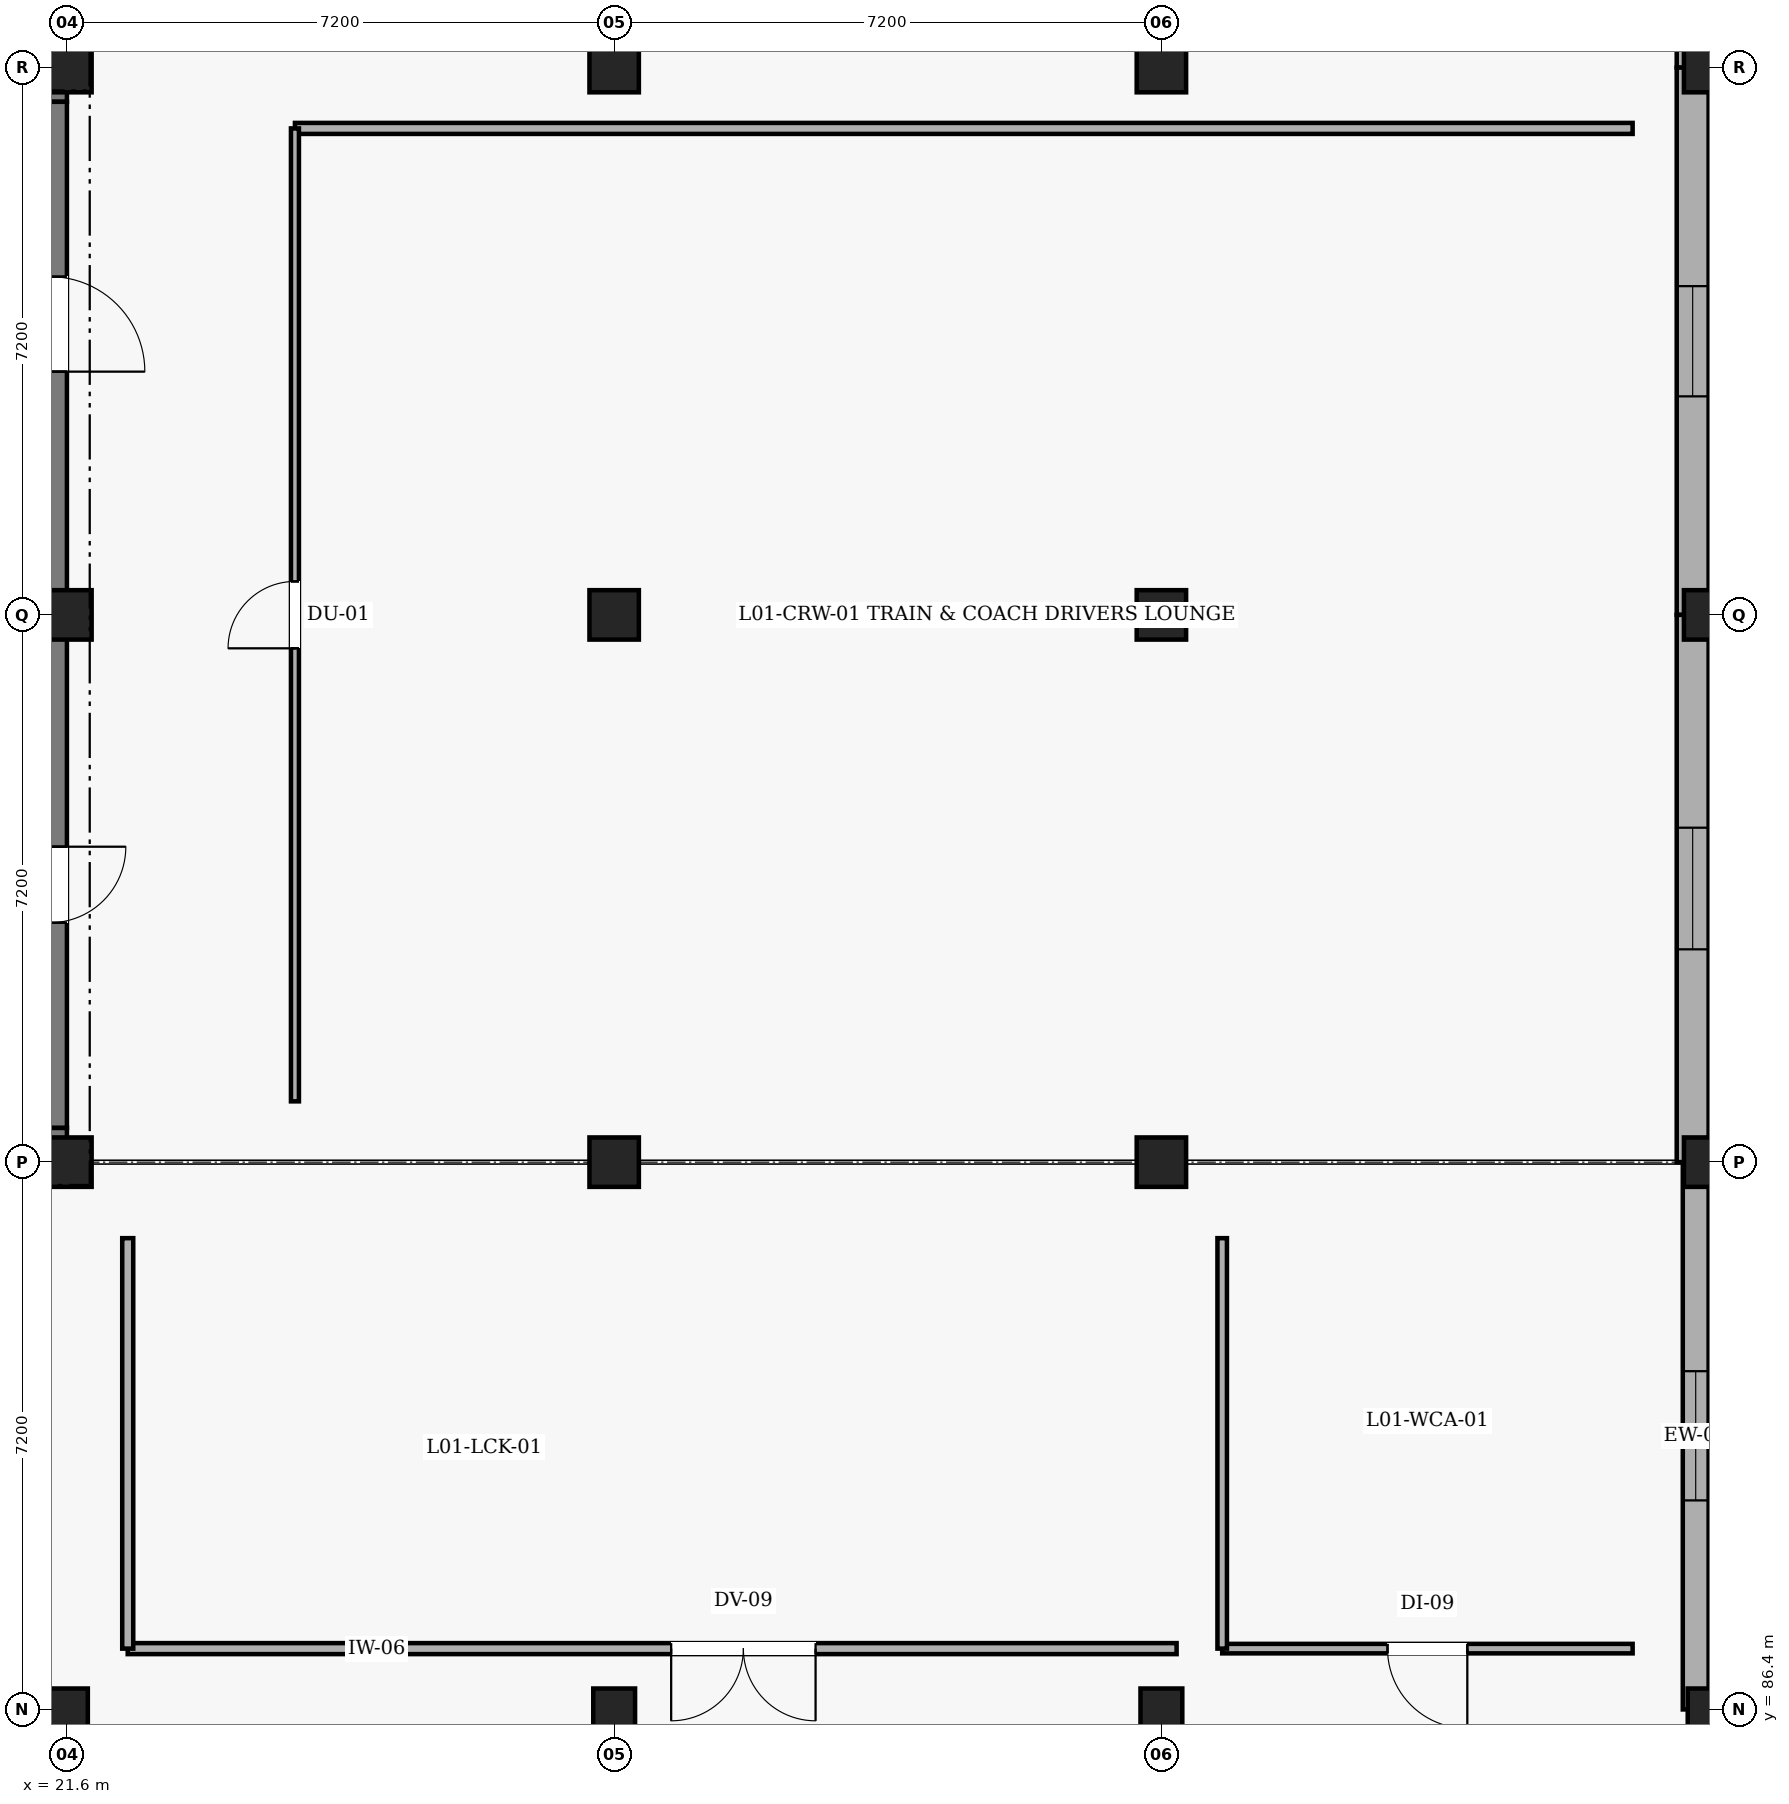
"""IFC4 building model, lengths in metres.
Left out: names, types, materials, properties, quantities, classifications, styles, units other than length and angle.
Written with IfcOpenShell. Run it as: python <this file> out.ifc"""

import sys

from ifc_helpers import new_model, si_unit, direction, frame, frame_2d, origin, origin_2d, place, context, subcontext, project, spatial, rectangle, extrude, element, fill, save


model = new_model("IFC4")
c1 = context("Model", 3, precision=1e-05, world=origin(), true_north=direction((0.0, 1.0)))
c2 = subcontext(c1, "Body", "Model", "MODEL_VIEW")
j1 = project(units=[si_unit("LENGTHUNIT", "METRE"), si_unit("PLANEANGLEUNIT", "RADIAN")], contexts=[c1])
p1 = place(None, origin())
s1 = spatial("IfcSite", under=j1, at=p1, CompositionType="ELEMENT")
p2 = place(p1, origin())
s2 = spatial("IfcBuilding", under=s1, at=p2, CompositionType="ELEMENT")
p3 = place(p2, frame((0.0, 0.0, 5.4)))
s3 = spatial("IfcBuildingStorey", under=s2, at=p3, CompositionType="ELEMENT", Elevation=5.4)
p4 = place(p3, frame((7.2, 107.775, 0.0), z_axis=(0.0, 0.0, 1.0), x_axis=(1.0, 0.0, 0.0)))
e1 = element("IfcWall", 1, at=p4, inside=s3, PredefinedType="SHEAR", context=c2, shape_type="SweptSolid", body=[
    extrude(rectangle(XDim=14.4, YDim=0.45, at=frame_2d((7.2, 0.0))), origin(), (0.0, 0.0, 1.0), 4.2),
])
p5 = place(p4, frame((2.4, 0.0, 0.0)))
e2 = element("IfcOpeningElement", 2, at=p5, cuts=e1, PredefinedType="OPENING", context=c2, shape_type="SweptSolid", body=[
    extrude(rectangle(XDim=1.25, YDim=2.2, at=frame_2d((0.625, 1.1))), frame((0.0, 0.235, 0.0), z_axis=(0.0, -1.0, 0.0), x_axis=(1.0, 0.0, 0.0)), (0.0, 0.0, 1.0), 0.47),
])
p6 = place(p3, frame((21.375, 107.55, 0.0), z_axis=(0.0, 0.0, 1.0), x_axis=(0.0, -1.0, 0.0)))
e3 = element("IfcWall", 3, at=p6, inside=s3, PredefinedType="SHEAR", context=c2, shape_type="SweptSolid", body=[
    extrude(rectangle(XDim=13.5, YDim=0.45, at=frame_2d((6.75, 0.0))), origin(), (0.0, 0.0, 1.0), 4.2),
])
p7 = place(p6, frame((9.8, 0.0, 0.0)))
e4 = element("IfcOpeningElement", 4, at=p7, cuts=e3, PredefinedType="OPENING", context=c2, shape_type="SweptSolid", body=[
    extrude(rectangle(XDim=1.0, YDim=2.15, at=frame_2d((0.5, 1.075))), frame((0.0, 0.235, 0.0), z_axis=(0.0, -1.0, 0.0), x_axis=(1.0, 0.0, 0.0)), (0.0, 0.0, 1.0), 0.47),
])
p8 = place(p6, frame((2.3, 0.0, 0.0)))
e5 = element("IfcOpeningElement", 5, at=p8, cuts=e3, PredefinedType="OPENING", context=c2, shape_type="SweptSolid", body=[
    extrude(rectangle(XDim=1.25, YDim=2.2, at=frame_2d((0.625, 1.1))), frame((0.0, 0.235, 0.0), z_axis=(0.0, -1.0, 0.0), x_axis=(1.0, 0.0, 0.0)), (0.0, 0.0, 1.0), 0.47),
])
p9 = place(p3, frame((21.6, 93.825, 0.0), z_axis=(0.0, 0.0, 1.0), x_axis=(-1.0, 0.0, 0.0)))
e6 = element("IfcWall", 6, at=p9, inside=s3, PredefinedType="SHEAR", context=c2, shape_type="SweptSolid", body=[
    extrude(rectangle(XDim=14.4, YDim=0.45, at=frame_2d((7.2, 0.0))), origin(), (0.0, 0.0, 1.0), 4.2),
])
p10 = place(p3, frame((21.6, 108.2, 0.0), z_axis=(0.0, 0.0, 1.0), x_axis=(-1.0, 0.0, 0.0)))
e7 = element("IfcWall", 7, at=p10, inside=s3, PredefinedType="SHEAR", context=c2, shape_type="SweptSolid", body=[
    extrude(rectangle(XDim=7.2, YDim=0.4, at=frame_2d((3.6, 0.0))), origin(), (0.0, 0.0, 1.0), 4.2),
])
p11 = place(p3, frame((7.2, 86.225, 0.0), z_axis=(0.0, 0.0, 1.0), x_axis=(1.0, 0.0, 0.0)))
e8 = element("IfcWall", 8, at=p11, inside=s3, PredefinedType="SHEAR", context=c2, shape_type="SweptSolid", body=[
    extrude(rectangle(XDim=14.4, YDim=0.35, at=frame_2d((7.2, 0.0))), origin(), (0.0, 0.0, 1.0), 4.2),
])
p12 = place(p3, frame((21.6, 86.4, 0.0), z_axis=(0.0, 0.0, 1.0), x_axis=(1.0, 0.0, 0.0)))
e9 = element("IfcColumn", 9, at=p12, inside=s3, PredefinedType="COLUMN", context=c2, shape_type="SweptSolid", body=[
    extrude(rectangle(XDim=0.55, YDim=0.55, at=origin_2d()), origin(), (0.0, 0.0, 1.0), 3.92),
])
for number, where, z_axis, x_axis in (
    (10, (21.6, 93.6, 0.0), (0.0, 0.0, 1.0), (1.0, 0.0, 0.0)),
    (11, (21.6, 100.8, 0.0), (0.0, 0.0, 1.0), (1.0, 0.0, 0.0)),
    (12, (21.6, 108.0, 0.0), (0.0, 0.0, 1.0), (1.0, 0.0, 0.0)),
):
    element("IfcColumn", number, at=place(p3, frame(where, z_axis=z_axis, x_axis=x_axis)), inside=s3, PredefinedType="COLUMN", context=c2, shape_type="SweptSolid", body=[
        extrude(rectangle(XDim=0.65, YDim=0.65, at=origin_2d()), origin(), (0.0, 0.0, 1.0), 3.88),
    ])
p13 = place(p3, frame((28.8, 86.4, 0.0), z_axis=(0.0, 0.0, 1.0), x_axis=(1.0, 0.0, 0.0)))
e13 = element("IfcColumn", 13, at=p13, inside=s3, PredefinedType="COLUMN", context=c2, shape_type="SweptSolid", body=[
    extrude(rectangle(XDim=0.55, YDim=0.55, at=origin_2d()), origin(), (0.0, 0.0, 1.0), 3.92),
])
for number, where, z_axis, x_axis in (
    (14, (28.8, 93.6, 0.0), (0.0, 0.0, 1.0), (1.0, 0.0, 0.0)),
    (15, (28.8, 100.8, 0.0), (0.0, 0.0, 1.0), (1.0, 0.0, 0.0)),
    (16, (28.8, 108.0, 0.0), (0.0, 0.0, 1.0), (1.0, 0.0, 0.0)),
):
    element("IfcColumn", number, at=place(p3, frame(where, z_axis=z_axis, x_axis=x_axis)), inside=s3, PredefinedType="COLUMN", context=c2, shape_type="SweptSolid", body=[
        extrude(rectangle(XDim=0.65, YDim=0.65, at=origin_2d()), origin(), (0.0, 0.0, 1.0), 3.88),
    ])
p14 = place(p3, frame((36.0, 86.4, 0.0), z_axis=(0.0, 0.0, 1.0), x_axis=(1.0, 0.0, 0.0)))
e17 = element("IfcColumn", 17, at=p14, inside=s3, PredefinedType="COLUMN", context=c2, shape_type="SweptSolid", body=[
    extrude(rectangle(XDim=0.55, YDim=0.55, at=origin_2d()), origin(), (0.0, 0.0, 1.0), 3.92),
])
for number, where, z_axis, x_axis in (
    (18, (36.0, 93.6, 0.0), (0.0, 0.0, 1.0), (1.0, 0.0, 0.0)),
    (19, (36.0, 100.8, 0.0), (0.0, 0.0, 1.0), (1.0, 0.0, 0.0)),
    (20, (36.0, 108.0, 0.0), (0.0, 0.0, 1.0), (1.0, 0.0, 0.0)),
):
    element("IfcColumn", number, at=place(p3, frame(where, z_axis=z_axis, x_axis=x_axis)), inside=s3, PredefinedType="COLUMN", context=c2, shape_type="SweptSolid", body=[
        extrude(rectangle(XDim=0.65, YDim=0.65, at=origin_2d()), origin(), (0.0, 0.0, 1.0), 3.88),
    ])
p15 = place(p3, frame((43.2, 86.4, 0.0), z_axis=(0.0, 0.0, 1.0), x_axis=(0.0, 1.0, 0.0)))
e21 = element("IfcColumn", 21, at=p15, inside=s3, PredefinedType="COLUMN", context=c2, shape_type="SweptSolid", body=[
    extrude(rectangle(XDim=0.55, YDim=0.55, at=origin_2d()), origin(), (0.0, 0.0, 1.0), 3.92),
])
for number, where, z_axis, x_axis in (
    (22, (43.2, 93.6, 0.0), (0.0, 0.0, 1.0), (0.0, 1.0, 0.0)),
    (23, (43.2, 100.8, 0.0), (0.0, 0.0, 1.0), (1.0, 0.0, 0.0)),
    (24, (43.2, 108.0, 0.0), (0.0, 0.0, 1.0), (1.0, 0.0, 0.0)),
):
    element("IfcColumn", number, at=place(p3, frame(where, z_axis=z_axis, x_axis=x_axis)), inside=s3, PredefinedType="COLUMN", context=c2, shape_type="SweptSolid", body=[
        extrude(rectangle(XDim=0.65, YDim=0.65, at=origin_2d()), origin(), (0.0, 0.0, 1.0), 3.88),
    ])
p16 = place(p3, frame((42.99, 115.2, 0.0), z_axis=(0.0, 0.0, 1.0), x_axis=(0.0, -1.0, 0.0)))
e25 = element("IfcWall", 25, at=p16, inside=s3, PredefinedType="SOLIDWALL", context=c2, shape_type="SweptSolid", body=[
    extrude(rectangle(XDim=7.2, YDim=0.42, at=frame_2d((3.6, 0.0))), origin(), (0.0, 0.0, 1.0), 3.55),
])
p17 = place(p16, frame((2.925, 0.0, 0.9)))
e26 = element("IfcOpeningElement", 26, at=p17, cuts=e25, PredefinedType="OPENING", context=c2, shape_type="SweptSolid", body=[
    extrude(rectangle(XDim=1.35, YDim=1.35, at=frame_2d((0.675, 0.675))), frame((0.0, 0.22, 0.0), z_axis=(0.0, -1.0, 0.0), x_axis=(1.0, 0.0, 0.0)), (0.0, 0.0, 1.0), 0.44),
])
p18 = place(p3, frame((42.99, 108.0, 0.0), z_axis=(0.0, 0.0, 1.0), x_axis=(0.0, -1.0, 0.0)))
e27 = element("IfcWall", 27, at=p18, inside=s3, PredefinedType="SOLIDWALL", context=c2, shape_type="SweptSolid", body=[
    extrude(rectangle(XDim=7.2, YDim=0.42, at=frame_2d((3.6, 0.0))), origin(), (0.0, 0.0, 1.0), 3.55),
])
p19 = place(p18, frame((2.875, 0.0, 0.9)))
e28 = element("IfcOpeningElement", 28, at=p19, cuts=e27, PredefinedType="OPENING", context=c2, shape_type="SweptSolid", body=[
    extrude(rectangle(XDim=1.45, YDim=1.45, at=frame_2d((0.725, 0.725))), frame((0.0, 0.22, 0.0), z_axis=(0.0, -1.0, 0.0), x_axis=(1.0, 0.0, 0.0)), (0.0, 0.0, 1.0), 0.44),
])
p20 = place(p3, frame((42.99, 100.8, 0.0), z_axis=(0.0, 0.0, 1.0), x_axis=(0.0, -1.0, 0.0)))
e29 = element("IfcWall", 29, at=p20, inside=s3, PredefinedType="SOLIDWALL", context=c2, shape_type="SweptSolid", body=[
    extrude(rectangle(XDim=7.2, YDim=0.42, at=frame_2d((3.6, 0.0))), origin(), (0.0, 0.0, 1.0), 3.55),
])
p21 = place(p20, frame((2.8, 0.0, 0.9)))
e30 = element("IfcOpeningElement", 30, at=p21, cuts=e29, PredefinedType="OPENING", context=c2, shape_type="SweptSolid", body=[
    extrude(rectangle(XDim=1.6, YDim=1.5, at=frame_2d((0.8, 0.75))), frame((0.0, 0.22, 0.0), z_axis=(0.0, -1.0, 0.0), x_axis=(1.0, 0.0, 0.0)), (0.0, 0.0, 1.0), 0.44),
])
p22 = place(p3, frame((43.03, 93.6, 0.0), z_axis=(0.0, 0.0, 1.0), x_axis=(0.0, -1.0, 0.0)))
e31 = element("IfcWall", 31, at=p22, inside=s3, PredefinedType="SOLIDWALL", context=c2, shape_type="SweptSolid", body=[
    extrude(rectangle(XDim=7.2, YDim=0.34, at=frame_2d((3.6, 0.0))), origin(), (0.0, 0.0, 1.0), 3.59),
])
p23 = place(p22, frame((2.75, 0.0, 0.9)))
e32 = element("IfcOpeningElement", 32, at=p23, cuts=e31, PredefinedType="OPENING", context=c2, shape_type="SweptSolid", body=[
    extrude(rectangle(XDim=1.7, YDim=1.55, at=frame_2d((0.85, 0.775))), frame((0.0, 0.18, 0.0), z_axis=(0.0, -1.0, 0.0), x_axis=(1.0, 0.0, 0.0)), (0.0, 0.0, 1.0), 0.36),
])
p24 = place(p3, frame((36.2, 87.2, 0.0), z_axis=(0.0, 0.0, 1.0), x_axis=(-1.0, 0.0, 0.0)))
e33 = element("IfcWall", 33, at=p24, inside=s3, PredefinedType="PARTITIONING", context=c2, shape_type="SweptSolid", body=[
    extrude(rectangle(XDim=13.8, YDim=0.145, at=frame_2d((6.9, 0.0))), origin(), (0.0, 0.0, 1.0), 3.52),
])
p25 = place(p24, frame((4.75, 0.0, 0.0)))
e34 = element("IfcOpeningElement", 34, at=p25, cuts=e33, PredefinedType="OPENING", context=c2, shape_type="SweptSolid", body=[
    extrude(rectangle(XDim=1.9, YDim=2.3, at=frame_2d((0.95, 1.15))), frame((0.0, 0.083, 0.0), z_axis=(0.0, -1.0, 0.0), x_axis=(1.0, 0.0, 0.0)), (0.0, 0.0, 1.0), 0.165),
])
p26 = place(p3, frame((22.4, 87.2, 0.0), z_axis=(0.0, 0.0, 1.0), x_axis=(0.0, 1.0, 0.0)))
e35 = element("IfcWall", 35, at=p26, inside=s3, PredefinedType="PARTITIONING", context=c2, shape_type="SweptSolid", body=[
    extrude(rectangle(XDim=5.4, YDim=0.145, at=frame_2d((2.7, 0.0))), origin(), (0.0, 0.0, 1.0), 3.59),
])
p27 = place(p3, frame((42.2, 87.2, 0.0), z_axis=(0.0, 0.0, 1.0), x_axis=(-1.0, 0.0, 0.0)))
e36 = element("IfcWall", 36, at=p27, inside=s3, PredefinedType="PARTITIONING", context=c2, shape_type="SweptSolid", body=[
    extrude(rectangle(XDim=5.4, YDim=0.125, at=frame_2d((2.7, 0.0))), origin(), (0.0, 0.0, 1.0), 3.85),
])
p28 = place(p27, frame((2.175, 0.0, 0.0)))
e37 = element("IfcOpeningElement", 37, at=p28, cuts=e36, PredefinedType="OPENING", context=c2, shape_type="SweptSolid", body=[
    extrude(rectangle(XDim=1.05, YDim=2.1, at=frame_2d((0.525, 1.05))), frame((0.0, 0.073, 0.0), z_axis=(0.0, -1.0, 0.0), x_axis=(1.0, 0.0, 0.0)), (0.0, 0.0, 1.0), 0.145),
])
p29 = place(p3, frame((36.8, 87.2, 0.0), z_axis=(0.0, 0.0, 1.0), x_axis=(0.0, 1.0, 0.0)))
e38 = element("IfcWall", 38, at=p29, inside=s3, PredefinedType="PARTITIONING", context=c2, shape_type="SweptSolid", body=[
    extrude(rectangle(XDim=5.4, YDim=0.125, at=frame_2d((2.7, 0.0))), origin(), (0.0, 0.0, 1.0), 3.59),
])
p30 = place(p3, frame((24.6, 107.2, 0.0), z_axis=(0.0, 0.0, 1.0), x_axis=(1.0, 0.0, 0.0)))
e39 = element("IfcWall", 39, at=p30, inside=s3, PredefinedType="PARTITIONING", context=c2, shape_type="SweptSolid", body=[
    extrude(rectangle(XDim=17.6, YDim=0.145, at=frame_2d((8.8, 0.0))), origin(), (0.0, 0.0, 1.0), 3.43),
])
p31 = place(p3, frame((24.6, 94.4, 0.0), z_axis=(0.0, 0.0, 1.0), x_axis=(0.0, 1.0, 0.0)))
e40 = element("IfcWall", 40, at=p31, inside=s3, PredefinedType="PARTITIONING", context=c2, shape_type="SweptSolid", body=[
    extrude(rectangle(XDim=12.8, YDim=0.105, at=frame_2d((6.4, 0.0))), origin(), (0.0, 0.0, 1.0), 3.43),
])
p32 = place(p31, frame((5.96, 0.0, 0.0)))
e41 = element("IfcOpeningElement", 41, at=p32, cuts=e40, PredefinedType="OPENING", context=c2, shape_type="SweptSolid", body=[
    extrude(rectangle(XDim=0.88, YDim=2.05, at=frame_2d((0.44, 1.025))), frame((0.0, 0.062, 0.0), z_axis=(0.0, -1.0, 0.0), x_axis=(1.0, 0.0, 0.0)), (0.0, 0.0, 1.0), 0.125),
])
p33 = place(p19, origin())
e42 = element("IfcWindow", 42, at=p33, inside=s3, PartitioningType="SINGLE_PANEL", PredefinedType="WINDOW", context=c2, shape_type="SweptSolid", body=[
    extrude(rectangle(XDim=1.45, YDim=1.45, at=frame_2d((0.725, 0.725))), frame((0.0, 0.03, 0.0), z_axis=(0.0, -1.0, 0.0), x_axis=(1.0, 0.0, 0.0)), (0.0, 0.0, 1.0), 0.06),
])
fill(e28, e42)
p34 = place(p21, origin())
e43 = element("IfcWindow", 43, at=p34, inside=s3, PartitioningType="SINGLE_PANEL", PredefinedType="WINDOW", context=c2, shape_type="SweptSolid", body=[
    extrude(rectangle(XDim=1.6, YDim=1.5, at=frame_2d((0.8, 0.75))), frame((0.0, 0.03, 0.0), z_axis=(0.0, -1.0, 0.0), x_axis=(1.0, 0.0, 0.0)), (0.0, 0.0, 1.0), 0.06),
])
fill(e30, e43)
p35 = place(p23, origin())
e44 = element("IfcWindow", 44, at=p35, inside=s3, PartitioningType="SINGLE_PANEL", PredefinedType="WINDOW", context=c2, shape_type="SweptSolid", body=[
    extrude(rectangle(XDim=1.7, YDim=1.55, at=frame_2d((0.85, 0.775))), frame((0.0, 0.03, 0.0), z_axis=(0.0, -1.0, 0.0), x_axis=(1.0, 0.0, 0.0)), (0.0, 0.0, 1.0), 0.06),
])
fill(e32, e44)
p36 = place(p25, origin())
e45 = element("IfcDoor", 45, at=p36, inside=s3, OperationType="DOUBLE_DOOR_SINGLE_SWING", PredefinedType="DOOR", context=c2, shape_type="SweptSolid", body=[
    extrude(rectangle(XDim=1.9, YDim=2.3, at=frame_2d((0.95, 1.15))), frame((0.0, 0.025, 0.0), z_axis=(0.0, -1.0, 0.0), x_axis=(1.0, 0.0, 0.0)), (0.0, 0.0, 1.0), 0.05),
])
fill(e34, e45)
p37 = place(p28, origin())
e46 = element("IfcDoor", 46, at=p37, inside=s3, OperationType="SINGLE_SWING_LEFT", PredefinedType="DOOR", context=c2, shape_type="SweptSolid", body=[
    extrude(rectangle(XDim=1.05, YDim=2.1, at=frame_2d((0.525, 1.05))), frame((0.0, 0.025, 0.0), z_axis=(0.0, -1.0, 0.0), x_axis=(1.0, 0.0, 0.0)), (0.0, 0.0, 1.0), 0.05),
])
fill(e37, e46)
p38 = place(p32, origin())
e47 = element("IfcDoor", 47, at=p38, inside=s3, OperationType="SINGLE_SWING_LEFT", PredefinedType="DOOR", context=c2, shape_type="SweptSolid", body=[
    extrude(rectangle(XDim=0.88, YDim=2.05, at=frame_2d((0.44, 1.025))), frame((0.0, 0.025, 0.0), z_axis=(0.0, -1.0, 0.0), x_axis=(1.0, 0.0, 0.0)), (0.0, 0.0, 1.0), 0.05),
])
fill(e41, e47)
save(model, sys.argv[1])
